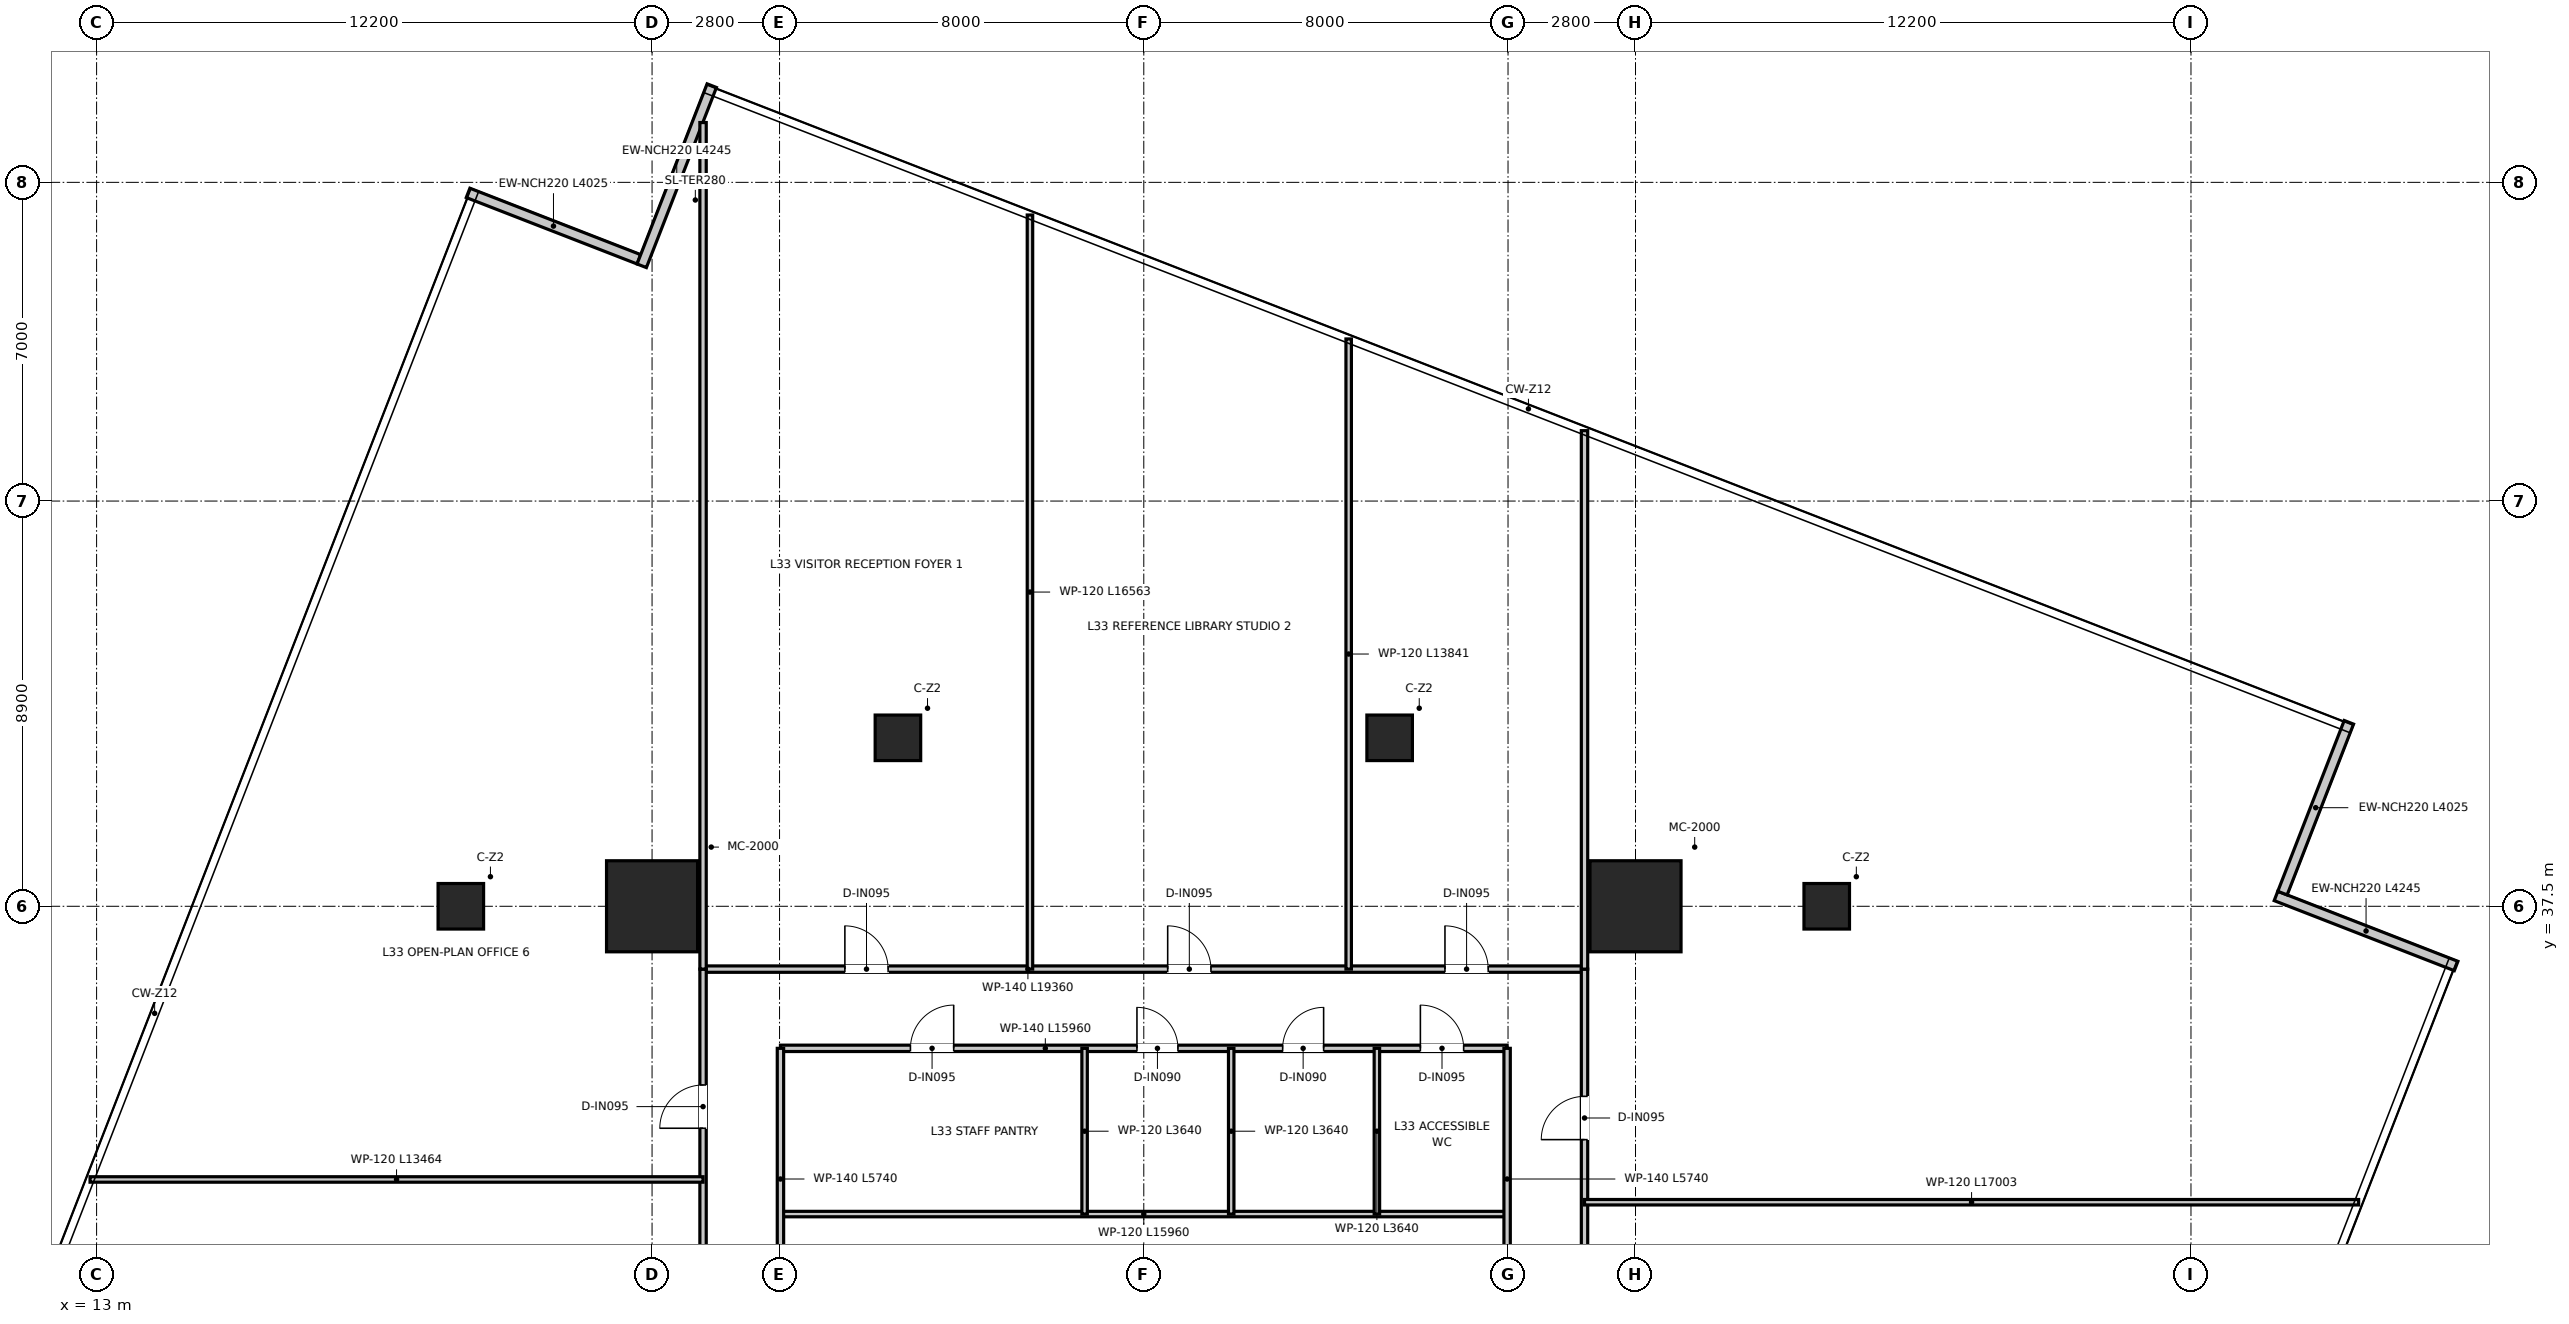
"""IFC4 building model, lengths in metres.
Left out: names, types, materials, properties, quantities, classifications, styles, units other than length and angle.
Written with IfcOpenShell. Run it as: python <this file> out.ifc"""

import sys

from ifc_helpers import new_model, si_unit, direction, frame, frame_2d, origin, origin_2d, place, context, subcontext, project, spatial, rectangle, extrude, source, transform, mapped, element, fill, save


model = new_model("IFC4")
c1 = context("Model", 3, precision=1e-05, world=origin(), true_north=direction((0.0, 1.0)))
c2 = subcontext(c1, "Body", "Model", "MODEL_VIEW")
j1 = project(units=[si_unit("LENGTHUNIT", "METRE"), si_unit("PLANEANGLEUNIT", "RADIAN")], contexts=[c1])
p1 = place(None, origin())
s1 = spatial("IfcSite", under=j1, at=p1, CompositionType="ELEMENT")
p2 = place(p1, origin())
s2 = spatial("IfcBuilding", under=s1, at=p2, CompositionType="ELEMENT")
p3 = place(p2, frame((0.0, 0.0, 137.45)))
s3 = spatial("IfcBuildingStorey", under=s2, at=p3, CompositionType="ELEMENT", Elevation=137.45)
m1 = source(origin(), c2, "Body", "SweptSolid", [
    extrude(rectangle(XDim=2.0, YDim=2.0, at=origin_2d()), origin(), (0.0, 0.0, 1.0), 3.95),
])
for number, where, z_axis, x_axis in (
    (1, (46.8, 37.5, 0.0), (0.0, 0.0, 1.0), (1.0, 0.0, 0.0)),
    (2, (25.2, 37.5, 0.0), (0.0, 0.0, 1.0), (1.0, 0.0, 0.0)),
):
    element("IfcColumn", number, at=place(p3, frame(where, z_axis=z_axis, x_axis=x_axis)), inside=s3, PredefinedType="USERDEFINED", context=c2, shape_type="MappedRepresentation", body=[
        mapped(m1, transform((0.0, 0.0, 0.0), x_axis=(1.0, 0.0, 0.0), y_axis=(0.0, 1.0, 0.0), z_axis=(0.0, 0.0, 1.0), scale=1.0)),
    ])
m2 = source(origin(), c2, "Body", "SweptSolid", [
    extrude(rectangle(XDim=1.0, YDim=1.0, at=origin_2d()), origin(), (0.0, 0.0, 1.0), 3.95),
])
for number, where, z_axis, x_axis in (
    (3, (21.0, 37.5, 0.0), (0.0, 0.0, 1.0), (1.0, 0.0, 0.0)),
    (4, (30.6, 41.2, 0.0), (0.0, 0.0, 1.0), (1.0, 0.0, 0.0)),
    (5, (41.4, 41.2, 0.0), (0.0, 0.0, 1.0), (1.0, 0.0, 0.0)),
    (6, (51.0, 37.5, 0.0), (0.0, 0.0, 1.0), (1.0, 0.0, 0.0)),
):
    element("IfcColumn", number, at=place(p3, frame(where, z_axis=z_axis, x_axis=x_axis)), inside=s3, PredefinedType="COLUMN", context=c2, shape_type="MappedRepresentation", body=[
        mapped(m2, transform((0.0, 0.0, 0.0), x_axis=(1.0, 0.0, 0.0), y_axis=(0.0, 1.0, 0.0), z_axis=(0.0, 0.0, 1.0), scale=1.0)),
    ])
p4 = place(p3, frame((24.91, 51.71, 0.0), z_axis=(0.0, 0.0, 1.0), x_axis=(-0.932010363197, 0.362431625129, 0.0)))
e7 = element("IfcWall", 7, at=p4, inside=s3, PredefinedType="ELEMENTEDWALL", context=c2, shape_type="SweptSolid", body=[
    extrude(rectangle(XDim=4.025, YDim=0.22, at=frame_2d((2.012, 0.0))), origin(), (0.0, 0.0, 1.0), 3.6),
])
p5 = place(p3, frame((64.824, 36.188, 0.0), z_axis=(0.0, 0.0, 1.0), x_axis=(-0.932003592198, 0.362449036596, 0.0)))
e8 = element("IfcWall", 8, at=p5, inside=s3, PredefinedType="ELEMENTEDWALL", context=c2, shape_type="SweptSolid", body=[
    extrude(rectangle(XDim=4.245, YDim=0.22, at=frame_2d((2.123, 0.0))), origin(), (0.0, 0.0, 1.0), 3.6),
])
p6 = place(p3, frame((61.01, 37.79, 0.0), z_axis=(0.0, 0.0, 1.0), x_axis=(0.362431625129, 0.932010363197, 0.0)))
e9 = element("IfcWall", 9, at=p6, inside=s3, PredefinedType="ELEMENTEDWALL", context=c2, shape_type="SweptSolid", body=[
    extrude(rectangle(XDim=4.025, YDim=0.22, at=frame_2d((2.012, 0.0))), origin(), (0.0, 0.0, 1.0), 3.6),
])
p7 = place(p3, frame((26.512, 55.524, 0.0), z_axis=(0.0, 0.0, 1.0), x_axis=(-0.362449036596, -0.932003592198, 0.0)))
e10 = element("IfcWall", 10, at=p7, inside=s3, PredefinedType="ELEMENTEDWALL", context=c2, shape_type="SweptSolid", body=[
    extrude(rectangle(XDim=4.245, YDim=0.22, at=frame_2d((2.123, 0.0))), origin(), (0.0, 0.0, 1.0), 3.6),
])
p8 = place(p3, frame((28.02, 30.74, 0.0), z_axis=(0.0, 0.0, 1.0), x_axis=(1.0, 0.0, 0.0)))
e11 = element("IfcWall", 11, at=p8, inside=s3, PredefinedType="PARTITIONING", context=c2, shape_type="SweptSolid", body=[
    extrude(rectangle(XDim=15.96, YDim=0.12, at=frame_2d((7.98, 0.0))), origin(), (0.0, 0.0, 1.0), 3.01),
])
p9 = place(p3, frame((28.02, 34.38, 0.0), z_axis=(0.0, 0.0, 1.0), x_axis=(1.0, 0.0, 0.0)))
e12 = element("IfcWall", 12, at=p9, inside=s3, PredefinedType="PARTITIONING", context=c2, shape_type="SweptSolid", body=[
    extrude(rectangle(XDim=15.96, YDim=0.14, at=frame_2d((7.98, 0.0))), origin(), (0.0, 0.0, 1.0), 3.01),
])
p10 = place(p9, frame((7.83, 0.0, 0.0)))
e13 = element("IfcOpeningElement", 13, at=p10, cuts=e12, PredefinedType="OPENING", context=c2, shape_type="SweptSolid", body=[
    extrude(rectangle(XDim=0.9, YDim=2.1, at=frame_2d((0.45, 1.05))), frame((0.0, 0.08, 0.0), z_axis=(0.0, -1.0, 0.0), x_axis=(1.0, 0.0, 0.0)), (0.0, 0.0, 1.0), 0.16),
])
p11 = place(p9, frame((11.03, 0.0, 0.0)))
e14 = element("IfcOpeningElement", 14, at=p11, cuts=e12, PredefinedType="OPENING", context=c2, shape_type="SweptSolid", body=[
    extrude(rectangle(XDim=0.9, YDim=2.1, at=frame_2d((0.45, 1.05))), frame((0.0, 0.08, 0.0), z_axis=(0.0, -1.0, 0.0), x_axis=(1.0, 0.0, 0.0)), (0.0, 0.0, 1.0), 0.16),
])
p12 = place(p9, frame((14.055, 0.0, 0.0)))
e15 = element("IfcOpeningElement", 15, at=p12, cuts=e12, PredefinedType="OPENING", context=c2, shape_type="SweptSolid", body=[
    extrude(rectangle(XDim=0.95, YDim=2.1, at=frame_2d((0.475, 1.05))), frame((0.0, 0.08, 0.0), z_axis=(0.0, -1.0, 0.0), x_axis=(1.0, 0.0, 0.0)), (0.0, 0.0, 1.0), 0.16),
])
p13 = place(p9, frame((2.855, 0.0, 0.0)))
e16 = element("IfcOpeningElement", 16, at=p13, cuts=e12, PredefinedType="OPENING", context=c2, shape_type="SweptSolid", body=[
    extrude(rectangle(XDim=0.95, YDim=2.1, at=frame_2d((0.475, 1.05))), frame((0.0, 0.08, 0.0), z_axis=(0.0, -1.0, 0.0), x_axis=(1.0, 0.0, 0.0)), (0.0, 0.0, 1.0), 0.16),
])
for number, where, z_axis, x_axis in (
    (17, (28.02, 28.64, 0.0), (0.0, 0.0, 1.0), (0.0, 1.0, 0.0)),
    (18, (43.98, 28.64, 0.0), (0.0, 0.0, 1.0), (0.0, 1.0, 0.0)),
):
    element("IfcWall", number, at=place(p3, frame(where, z_axis=z_axis, x_axis=x_axis)), inside=s3, PredefinedType="PARTITIONING", context=c2, shape_type="SweptSolid", body=[
        extrude(rectangle(XDim=5.74, YDim=0.14, at=frame_2d((2.87, 0.0))), origin(), (0.0, 0.0, 1.0), 3.2),
    ])
for number, where, z_axis, x_axis in (
    (19, (37.92, 30.74, 0.0), (0.0, 0.0, 1.0), (0.0, 1.0, 0.0)),
    (20, (41.12, 30.74, 0.0), (0.0, 0.0, 1.0), (0.0, 1.0, 0.0)),
    (21, (34.7, 30.74, 0.0), (0.0, 0.0, 1.0), (0.0, 1.0, 0.0)),
):
    element("IfcWall", number, at=place(p3, frame(where, z_axis=z_axis, x_axis=x_axis)), inside=s3, PredefinedType="PARTITIONING", context=c2, shape_type="SweptSolid", body=[
        extrude(rectangle(XDim=3.64, YDim=0.12, at=frame_2d((1.82, 0.0))), origin(), (0.0, 0.0, 1.0), 3.1),
    ])
p14 = place(p3, frame((26.32, 36.12, 0.0), z_axis=(0.0, 0.0, 1.0), x_axis=(1.0, 0.0, 0.0)))
e22 = element("IfcWall", 22, at=p14, inside=s3, PredefinedType="PARTITIONING", context=c2, shape_type="SweptSolid", body=[
    extrude(rectangle(XDim=19.36, YDim=0.14, at=frame_2d((9.68, 0.0))), origin(), (0.0, 0.0, 1.0), 3.01),
])
p15 = place(p14, frame((3.115, 0.0, 0.0)))
e23 = element("IfcOpeningElement", 23, at=p15, cuts=e22, PredefinedType="OPENING", context=c2, shape_type="SweptSolid", body=[
    extrude(rectangle(XDim=0.95, YDim=2.1, at=frame_2d((0.475, 1.05))), frame((0.0, 0.08, 0.0), z_axis=(0.0, -1.0, 0.0), x_axis=(1.0, 0.0, 0.0)), (0.0, 0.0, 1.0), 0.16),
])
p16 = place(p14, frame((10.205, 0.0, 0.0)))
e24 = element("IfcOpeningElement", 24, at=p16, cuts=e22, PredefinedType="OPENING", context=c2, shape_type="SweptSolid", body=[
    extrude(rectangle(XDim=0.95, YDim=2.1, at=frame_2d((0.475, 1.05))), frame((0.0, 0.08, 0.0), z_axis=(0.0, -1.0, 0.0), x_axis=(1.0, 0.0, 0.0)), (0.0, 0.0, 1.0), 0.16),
])
p17 = place(p14, frame((16.295, 0.0, 0.0)))
e25 = element("IfcOpeningElement", 25, at=p17, cuts=e22, PredefinedType="OPENING", context=c2, shape_type="SweptSolid", body=[
    extrude(rectangle(XDim=0.95, YDim=2.1, at=frame_2d((0.475, 1.05))), frame((0.0, 0.08, 0.0), z_axis=(0.0, -1.0, 0.0), x_axis=(1.0, 0.0, 0.0)), (0.0, 0.0, 1.0), 0.16),
])
p18 = place(p3, frame((26.32, 10.5, 0.0), z_axis=(0.0, 0.0, 1.0), x_axis=(0.0, 1.0, 0.0)))
e26 = element("IfcWall", 26, at=p18, inside=s3, PredefinedType="PARTITIONING", context=c2, shape_type="SweptSolid", body=[
    extrude(rectangle(XDim=25.62, YDim=0.14, at=frame_2d((12.81, 0.0))), origin(), (0.0, 0.0, 1.0), 2.9),
])
p19 = place(p18, frame((9.525, 0.0, 0.0)))
e27 = element("IfcOpeningElement", 27, at=p19, cuts=e26, PredefinedType="OPENING", context=c2, shape_type="SweptSolid", body=[
    extrude(rectangle(XDim=0.95, YDim=2.1, at=frame_2d((0.475, 1.05))), frame((0.0, 0.08, 0.0), z_axis=(0.0, -1.0, 0.0), x_axis=(1.0, 0.0, 0.0)), (0.0, 0.0, 1.0), 0.16),
])
p20 = place(p18, frame((16.525, 0.0, 0.0)))
e28 = element("IfcOpeningElement", 28, at=p20, cuts=e26, PredefinedType="OPENING", context=c2, shape_type="SweptSolid", body=[
    extrude(rectangle(XDim=0.95, YDim=2.1, at=frame_2d((0.475, 1.05))), frame((0.0, 0.08, 0.0), z_axis=(0.0, -1.0, 0.0), x_axis=(1.0, 0.0, 0.0)), (0.0, 0.0, 1.0), 0.16),
])
p21 = place(p18, frame((22.125, 0.0, 0.0)))
e29 = element("IfcOpeningElement", 29, at=p21, cuts=e26, PredefinedType="OPENING", context=c2, shape_type="SweptSolid", body=[
    extrude(rectangle(XDim=0.95, YDim=2.1, at=frame_2d((0.475, 1.05))), frame((0.0, 0.08, 0.0), z_axis=(0.0, -1.0, 0.0), x_axis=(1.0, 0.0, 0.0)), (0.0, 0.0, 1.0), 0.16),
])
p22 = place(p3, frame((45.68, 10.5, 0.0), z_axis=(0.0, 0.0, 1.0), x_axis=(0.0, 1.0, 0.0)))
e30 = element("IfcWall", 30, at=p22, inside=s3, PredefinedType="PARTITIONING", context=c2, shape_type="SweptSolid", body=[
    extrude(rectangle(XDim=25.62, YDim=0.14, at=frame_2d((12.81, 0.0))), origin(), (0.0, 0.0, 1.0), 2.9),
])
p23 = place(p22, frame((7.775, 0.0, 0.0)))
e31 = element("IfcOpeningElement", 31, at=p23, cuts=e30, PredefinedType="OPENING", context=c2, shape_type="SweptSolid", body=[
    extrude(rectangle(XDim=0.95, YDim=2.1, at=frame_2d((0.475, 1.05))), frame((0.0, 0.08, 0.0), z_axis=(0.0, -1.0, 0.0), x_axis=(1.0, 0.0, 0.0)), (0.0, 0.0, 1.0), 0.16),
])
p24 = place(p22, frame((11.775, 0.0, 0.0)))
e32 = element("IfcOpeningElement", 32, at=p24, cuts=e30, PredefinedType="OPENING", context=c2, shape_type="SweptSolid", body=[
    extrude(rectangle(XDim=0.95, YDim=2.1, at=frame_2d((0.475, 1.05))), frame((0.0, 0.08, 0.0), z_axis=(0.0, -1.0, 0.0), x_axis=(1.0, 0.0, 0.0)), (0.0, 0.0, 1.0), 0.16),
])
p25 = place(p22, frame((17.275, 0.0, 0.0)))
e33 = element("IfcOpeningElement", 33, at=p25, cuts=e30, PredefinedType="OPENING", context=c2, shape_type="SweptSolid", body=[
    extrude(rectangle(XDim=0.95, YDim=2.1, at=frame_2d((0.475, 1.05))), frame((0.0, 0.08, 0.0), z_axis=(0.0, -1.0, 0.0), x_axis=(1.0, 0.0, 0.0)), (0.0, 0.0, 1.0), 0.16),
])
p26 = place(p22, frame((21.875, 0.0, 0.0)))
e34 = element("IfcOpeningElement", 34, at=p26, cuts=e30, PredefinedType="OPENING", context=c2, shape_type="SweptSolid", body=[
    extrude(rectangle(XDim=0.95, YDim=2.1, at=frame_2d((0.475, 1.05))), frame((0.0, 0.08, 0.0), z_axis=(0.0, -1.0, 0.0), x_axis=(1.0, 0.0, 0.0)), (0.0, 0.0, 1.0), 0.16),
])
p27 = place(p3, frame((26.32, 36.12, 0.0), z_axis=(0.0, 0.0, 1.0), x_axis=(0.0, 1.0, 0.0)))
e35 = element("IfcWall", 35, at=p27, inside=s3, PredefinedType="PARTITIONING", context=c2, shape_type="SweptSolid", body=[
    extrude(rectangle(XDim=18.594, YDim=0.14, at=frame_2d((9.297, 0.0))), origin(), (0.0, 0.0, 1.0), 2.9),
])
p28 = place(p3, frame((45.68, 36.12, 0.0), z_axis=(0.0, 0.0, 1.0), x_axis=(0.0, 1.0, 0.0)))
e36 = element("IfcWall", 36, at=p28, inside=s3, PredefinedType="PARTITIONING", context=c2, shape_type="SweptSolid", body=[
    extrude(rectangle(XDim=11.826, YDim=0.14, at=frame_2d((5.913, 0.0))), origin(), (0.0, 0.0, 1.0), 2.9),
])
p29 = place(p3, frame((33.5, 36.12, 0.0), z_axis=(0.0, 0.0, 1.0), x_axis=(0.0, 1.0, 0.0)))
e37 = element("IfcWall", 37, at=p29, inside=s3, PredefinedType="PARTITIONING", context=c2, shape_type="SweptSolid", body=[
    extrude(rectangle(XDim=16.562, YDim=0.12, at=frame_2d((8.281, 0.0))), origin(), (0.0, 0.0, 1.0), 2.9),
])
p30 = place(p3, frame((40.5, 36.12, 0.0), z_axis=(0.0, 0.0, 1.0), x_axis=(0.0, 1.0, 0.0)))
e38 = element("IfcWall", 38, at=p30, inside=s3, PredefinedType="PARTITIONING", context=c2, shape_type="SweptSolid", body=[
    extrude(rectangle(XDim=13.841, YDim=0.12, at=frame_2d((6.92, 0.0))), origin(), (0.0, 0.0, 1.0), 2.9),
])
p31 = place(p3, frame((12.856, 31.5, 0.0), z_axis=(0.0, 0.0, 1.0), x_axis=(1.0, 0.0, 0.0)))
e39 = element("IfcWall", 39, at=p31, inside=s3, PredefinedType="PARTITIONING", context=c2, shape_type="SweptSolid", body=[
    extrude(rectangle(XDim=13.464, YDim=0.12, at=frame_2d((6.732, 0.0))), origin(), (0.0, 0.0, 1.0), 2.9),
])
p32 = place(p3, frame((45.68, 31.0, 0.0), z_axis=(0.0, 0.0, 1.0), x_axis=(1.0, 0.0, 0.0)))
e40 = element("IfcWall", 40, at=p32, inside=s3, PredefinedType="PARTITIONING", context=c2, shape_type="SweptSolid", body=[
    extrude(rectangle(XDim=17.003, YDim=0.12, at=frame_2d((8.501, 0.0))), origin(), (0.0, 0.0, 1.0), 2.9),
])
p33 = place(p10, origin())
e41 = element("IfcDoor", 41, at=p33, inside=s3, OperationType="SINGLE_SWING_LEFT", PredefinedType="DOOR", context=c2, shape_type="SweptSolid", body=[
    extrude(rectangle(XDim=0.9, YDim=2.1, at=frame_2d((0.45, 1.05))), frame((0.0, 0.025, 0.0), z_axis=(0.0, -1.0, 0.0), x_axis=(1.0, 0.0, 0.0)), (0.0, 0.0, 1.0), 0.05),
])
fill(e13, e41)
p34 = place(p11, origin())
e42 = element("IfcDoor", 42, at=p34, inside=s3, OperationType="SINGLE_SWING_RIGHT", PredefinedType="DOOR", context=c2, shape_type="SweptSolid", body=[
    extrude(rectangle(XDim=0.9, YDim=2.1, at=frame_2d((0.45, 1.05))), frame((0.0, 0.025, 0.0), z_axis=(0.0, -1.0, 0.0), x_axis=(1.0, 0.0, 0.0)), (0.0, 0.0, 1.0), 0.05),
])
fill(e14, e42)
p35 = place(p12, origin())
e43 = element("IfcDoor", 43, at=p35, inside=s3, OperationType="SINGLE_SWING_LEFT", PredefinedType="DOOR", context=c2, shape_type="SweptSolid", body=[
    extrude(rectangle(XDim=0.95, YDim=2.1, at=frame_2d((0.475, 1.05))), frame((0.0, 0.025, 0.0), z_axis=(0.0, -1.0, 0.0), x_axis=(1.0, 0.0, 0.0)), (0.0, 0.0, 1.0), 0.05),
])
fill(e15, e43)
p36 = place(p13, origin())
e44 = element("IfcDoor", 44, at=p36, inside=s3, OperationType="SINGLE_SWING_RIGHT", PredefinedType="DOOR", context=c2, shape_type="SweptSolid", body=[
    extrude(rectangle(XDim=0.95, YDim=2.1, at=frame_2d((0.475, 1.05))), frame((0.0, 0.025, 0.0), z_axis=(0.0, -1.0, 0.0), x_axis=(1.0, 0.0, 0.0)), (0.0, 0.0, 1.0), 0.05),
])
fill(e16, e44)
p37 = place(p15, origin())
e45 = element("IfcDoor", 45, at=p37, inside=s3, OperationType="SINGLE_SWING_LEFT", PredefinedType="DOOR", context=c2, shape_type="SweptSolid", body=[
    extrude(rectangle(XDim=0.95, YDim=2.1, at=frame_2d((0.475, 1.05))), frame((0.0, 0.025, 0.0), z_axis=(0.0, -1.0, 0.0), x_axis=(1.0, 0.0, 0.0)), (0.0, 0.0, 1.0), 0.05),
])
fill(e23, e45)
p38 = place(p16, origin())
e46 = element("IfcDoor", 46, at=p38, inside=s3, OperationType="SINGLE_SWING_LEFT", PredefinedType="DOOR", context=c2, shape_type="SweptSolid", body=[
    extrude(rectangle(XDim=0.95, YDim=2.1, at=frame_2d((0.475, 1.05))), frame((0.0, 0.025, 0.0), z_axis=(0.0, -1.0, 0.0), x_axis=(1.0, 0.0, 0.0)), (0.0, 0.0, 1.0), 0.05),
])
fill(e24, e46)
p39 = place(p17, origin())
e47 = element("IfcDoor", 47, at=p39, inside=s3, OperationType="SINGLE_SWING_LEFT", PredefinedType="DOOR", context=c2, shape_type="SweptSolid", body=[
    extrude(rectangle(XDim=0.95, YDim=2.1, at=frame_2d((0.475, 1.05))), frame((0.0, 0.025, 0.0), z_axis=(0.0, -1.0, 0.0), x_axis=(1.0, 0.0, 0.0)), (0.0, 0.0, 1.0), 0.05),
])
fill(e25, e47)
p40 = place(p21, origin())
e48 = element("IfcDoor", 48, at=p40, inside=s3, OperationType="SINGLE_SWING_LEFT", PredefinedType="DOOR", context=c2, shape_type="SweptSolid", body=[
    extrude(rectangle(XDim=0.95, YDim=2.1, at=frame_2d((0.475, 1.05))), frame((0.0, 0.025, 0.0), z_axis=(0.0, -1.0, 0.0), x_axis=(1.0, 0.0, 0.0)), (0.0, 0.0, 1.0), 0.05),
])
fill(e29, e48)
p41 = place(p26, origin())
e49 = element("IfcDoor", 49, at=p41, inside=s3, OperationType="SINGLE_SWING_LEFT", PredefinedType="DOOR", context=c2, shape_type="SweptSolid", body=[
    extrude(rectangle(XDim=0.95, YDim=2.1, at=frame_2d((0.475, 1.05))), frame((0.0, 0.025, 0.0), z_axis=(0.0, -1.0, 0.0), x_axis=(1.0, 0.0, 0.0)), (0.0, 0.0, 1.0), 0.05),
])
fill(e34, e49)
save(model, sys.argv[1])
